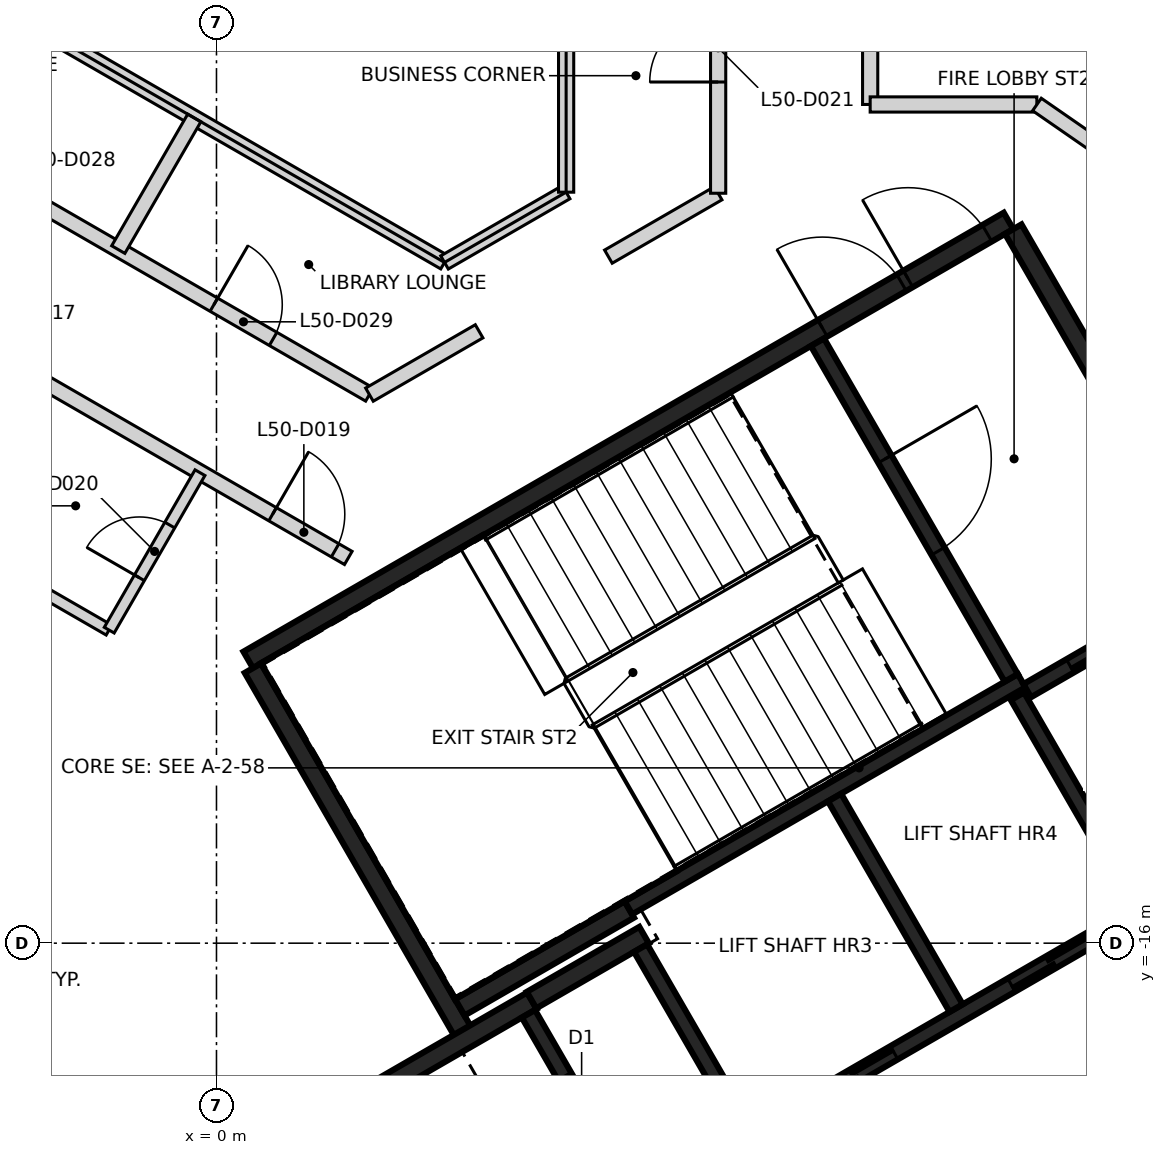
"""IFC4 building model, lengths in metres.
Left out: names, types, materials, properties, quantities, classifications, styles, units other than length and angle.
Written with IfcOpenShell. Run it as: python <this file> out.ifc"""

import sys

from ifc_helpers import new_model, si_unit, direction, frame, frame_2d, origin, place, context, subcontext, project, spatial, rectangle, extrude, element, fill, save


model = new_model("IFC4")
c1 = context("Model", 3, precision=1e-05, world=origin(), true_north=direction((0.0, 1.0)))
c2 = subcontext(c1, "Body", "Model", "MODEL_VIEW")
j1 = project(units=[si_unit("LENGTHUNIT", "METRE"), si_unit("PLANEANGLEUNIT", "RADIAN")], contexts=[c1])
p1 = place(None, origin())
s1 = spatial("IfcSite", under=j1, at=p1, CompositionType="ELEMENT")
p2 = place(p1, origin())
s2 = spatial("IfcBuilding", under=s1, at=p2, CompositionType="ELEMENT")
p3 = place(p2, frame((0.0, 0.0, 200.8)))
s3 = spatial("IfcBuildingStorey", under=s2, at=p3, CompositionType="ELEMENT", Elevation=200.8)
p4 = place(p3, frame((0.417, -12.273, 0.0), z_axis=(0.0, 0.0, 1.0), x_axis=(0.866021906294, 0.500006057782, 0.0)))
e1 = element("IfcWall", 1, at=p4, inside=s3, PredefinedType="SHEAR", context=c2, shape_type="SweptSolid", body=[
    extrude(rectangle(XDim=11.55, YDim=0.25, at=frame_2d((5.775, 0.0))), origin(), (0.0, 0.0, 1.0), 3.25),
])
p5 = place(p4, frame((10.025, 0.0, 0.0)))
e2 = element("IfcOpeningElement", 2, at=p5, cuts=e1, PredefinedType="OPENING", context=c2, shape_type="SweptSolid", body=[
    extrude(rectangle(XDim=1.2, YDim=2.1, at=frame_2d((0.6, 1.05))), frame((0.0, 0.135, 0.0), z_axis=(0.0, -1.0, 0.0), x_axis=(1.0, 0.0, 0.0)), (0.0, 0.0, 1.0), 0.27),
])
p6 = place(p4, frame((8.725, 0.0, 0.0)))
e3 = element("IfcOpeningElement", 3, at=p6, cuts=e1, PredefinedType="OPENING", context=c2, shape_type="SweptSolid", body=[
    extrude(rectangle(XDim=1.2, YDim=2.1, at=frame_2d((0.6, 1.05))), frame((0.0, 0.135, 0.0), z_axis=(0.0, -1.0, 0.0), x_axis=(1.0, 0.0, 0.0)), (0.0, 0.0, 1.0), 0.27),
])
p7 = place(p3, frame((16.133, -16.594, 0.0), z_axis=(0.0, 0.0, 1.0), x_axis=(-0.866022959057, -0.500004234368, 0.0)))
e4 = element("IfcWall", 4, at=p7, inside=s3, PredefinedType="SHEAR", context=c2, shape_type="SweptSolid", body=[
    extrude(rectangle(XDim=8.75, YDim=0.25, at=frame_2d((4.375, 0.0))), origin(), (0.0, 0.0, 1.0), 3.25),
])
p8 = place(p3, frame((3.235, -17.153, 0.0), z_axis=(0.0, 0.0, 1.0), x_axis=(-0.500008851346, 0.866020293397, 0.0)))
e5 = element("IfcWall", 5, at=p8, inside=s3, PredefinedType="SHEAR", context=c2, shape_type="SweptSolid", body=[
    extrude(rectangle(XDim=5.51, YDim=0.25, at=frame_2d((2.755, 0.0))), origin(), (0.0, 0.0, 1.0), 3.25),
])
p9 = place(p3, frame((10.483, -6.606, 0.0), z_axis=(0.0, 0.0, 1.0), x_axis=(0.49999885962, -0.866026062182, 0.0)))
e6 = element("IfcWall", 6, at=p9, inside=s3, PredefinedType="SHEAR", context=c2, shape_type="SweptSolid", body=[
    extrude(rectangle(XDim=5.225, YDim=0.25, at=frame_2d((2.612, 0.0))), origin(), (0.0, 0.0, 1.0), 3.25),
])
p10 = place(p3, frame((1.669, -18.19, 0.0), z_axis=(0.0, 0.0, 1.0), x_axis=(0.866042235819, 0.499970844928, 0.0)))
e7 = element("IfcWall", 7, at=p10, inside=s3, PredefinedType="SHEAR", context=c2, shape_type="SweptSolid", body=[
    extrude(rectangle(XDim=2.865, YDim=0.25, at=frame_2d((1.432, 0.0))), origin(), (0.0, 0.0, 1.0), 3.25),
])
p11 = place(p3, frame((5.431, -15.556, 0.0), z_axis=(0.0, 0.0, 1.0), x_axis=(-0.866022940537, -0.500004266446, 0.0)))
e8 = element("IfcWall", 8, at=p11, inside=s3, PredefinedType="SHEAR", context=c2, shape_type="SweptSolid", body=[
    extrude(rectangle(XDim=2.575, YDim=0.25, at=frame_2d((1.287, 0.0))), origin(), (0.0, 0.0, 1.0), 3.25),
])
p12 = place(p3, frame((4.145, -16.749, 0.0), z_axis=(0.0, 0.0, 1.0), x_axis=(0.866038183914, 0.499977863513, 0.0)))
e9 = element("IfcWall", 9, at=p12, inside=s3, PredefinedType="SHEAR", context=c2, shape_type="SweptSolid", body=[
    extrude(rectangle(XDim=1.71, YDim=0.25, at=frame_2d((0.855, 0.0))), origin(), (0.0, 0.0, 1.0), 3.25),
])
p13 = place(p3, frame((5.419, -15.534, 0.0), z_axis=(0.0, 0.0, 1.0), x_axis=(0.866029065029, 0.499993658486, 0.0)))
e10 = element("IfcWall", 10, at=p13, inside=s3, PredefinedType="SHEAR", context=c2, shape_type="SweptSolid", body=[
    extrude(rectangle(XDim=5.974, YDim=0.2, at=frame_2d((2.987, 0.0))), origin(), (0.0, 0.0, 1.0), 3.25),
])
p14 = place(p3, frame((7.01, -18.542, 0.0), z_axis=(0.0, 0.0, 1.0), x_axis=(0.866030299012, 0.499991521122, 0.0)))
e11 = element("IfcWall", 11, at=p14, inside=s3, PredefinedType="SHEAR", context=c2, shape_type="SweptSolid", body=[
    extrude(rectangle(XDim=6.1, YDim=0.2, at=frame_2d((3.05, 0.0))), origin(), (0.0, 0.0, 1.0), 3.25),
])
p15 = place(p14, frame((1.0, 0.0, 0.0)))
e12 = element("IfcOpeningElement", 12, at=p15, cuts=e11, PredefinedType="OPENING", context=c2, shape_type="SweptSolid", body=[
    extrude(rectangle(XDim=1.2, YDim=2.1, at=frame_2d((0.6, 1.05))), frame((0.0, 0.11, 0.0), z_axis=(0.0, -1.0, 0.0), x_axis=(1.0, 0.0, 0.0)), (0.0, 0.0, 1.0), 0.22),
])
p16 = place(p14, frame((3.982, 0.0, 0.0)))
e13 = element("IfcOpeningElement", 13, at=p16, cuts=e11, PredefinedType="OPENING", context=c2, shape_type="SweptSolid", body=[
    extrude(rectangle(XDim=1.2, YDim=2.1, at=frame_2d((0.6, 1.05))), frame((0.0, 0.11, 0.0), z_axis=(0.0, -1.0, 0.0), x_axis=(1.0, 0.0, 0.0)), (0.0, 0.0, 1.0), 0.22),
])
p17 = place(p3, frame((7.906, -8.094, 0.0), z_axis=(0.0, 0.0, 1.0), x_axis=(0.500027839223, -0.866009330205, 0.0)))
e14 = element("IfcWall", 14, at=p17, inside=s3, PredefinedType="SHEAR", context=c2, shape_type="SweptSolid", body=[
    extrude(rectangle(XDim=5.098, YDim=0.2, at=frame_2d((2.549, 0.0))), origin(), (0.0, 0.0, 1.0), 3.25),
])
p18 = place(p17, frame((1.774, 0.0, 0.0)))
e15 = element("IfcOpeningElement", 15, at=p18, cuts=e14, PredefinedType="OPENING", context=c2, shape_type="SweptSolid", body=[
    extrude(rectangle(XDim=1.4, YDim=2.1, at=frame_2d((0.7, 1.05))), frame((0.0, 0.11, 0.0), z_axis=(0.0, -1.0, 0.0), x_axis=(1.0, 0.0, 0.0)), (0.0, 0.0, 1.0), 0.22),
])
p19 = place(p3, frame((8.132, -14.084, 0.0), z_axis=(0.0, 0.0, 1.0), x_axis=(0.499997778408, -0.866026686418, 0.0)))
e16 = element("IfcWall", 16, at=p19, inside=s3, PredefinedType="SHEAR", context=c2, shape_type="SweptSolid", body=[
    extrude(rectangle(XDim=3.198, YDim=0.2, at=frame_2d((1.599, 0.0))), origin(), (0.0, 0.0, 1.0), 3.25),
])
p20 = place(p3, frame((5.503, -19.352, 0.0), z_axis=(0.0, 0.0, 1.0), x_axis=(-0.499986818241, 0.866033014143, 0.0)))
e17 = element("IfcWall", 17, at=p20, inside=s3, PredefinedType="SHEAR", context=c2, shape_type="SweptSolid", body=[
    extrude(rectangle(XDim=2.798, YDim=0.2, at=frame_2d((1.399, 0.0))), origin(), (0.0, 0.0, 1.0), 3.25),
])
p21 = place(p20, frame((0.949, 0.0, 0.0)))
e18 = element("IfcOpeningElement", 18, at=p21, cuts=e17, PredefinedType="OPENING", context=c2, shape_type="SweptSolid", body=[
    extrude(rectangle(XDim=0.9, YDim=2.1, at=frame_2d((0.45, 1.05))), frame((0.0, 0.11, 0.0), z_axis=(0.0, -1.0, 0.0), x_axis=(1.0, 0.0, 0.0)), (0.0, 0.0, 1.0), 0.22),
])
p22 = place(p3, frame((6.96, -18.455, 0.0), z_axis=(0.0, 0.0, 1.0), x_axis=(-0.499926705758, 0.866067716099, 0.0)))
e19 = element("IfcWall", 19, at=p22, inside=s3, PredefinedType="SHEAR", context=c2, shape_type="SweptSolid", body=[
    extrude(rectangle(XDim=2.759, YDim=0.2, at=frame_2d((1.38, 0.0))), origin(), (0.0, 0.0, 1.0), 3.25),
])
p23 = place(p3, frame((12.088, -15.437, 0.0), z_axis=(0.0, 0.0, 1.0), x_axis=(-0.500026960575, 0.86600983753, 0.0)))
e20 = element("IfcWall", 20, at=p23, inside=s3, PredefinedType="SHEAR", context=c2, shape_type="SweptSolid", body=[
    extrude(rectangle(XDim=3.1, YDim=0.2, at=frame_2d((1.55, 0.0))), origin(), (0.0, 0.0, 1.0), 3.25),
])
p24 = place(p3, frame((10.666, -12.678, 0.0), z_axis=(0.0, 0.0, 1.0), x_axis=(0.866018407898, 0.500012117035, 0.0)))
e21 = element("IfcWall", 21, at=p24, inside=s3, PredefinedType="SHEAR", context=c2, shape_type="SweptSolid", body=[
    extrude(rectangle(XDim=2.651, YDim=0.2, at=frame_2d((1.325, 0.0))), origin(), (0.0, 0.0, 1.0), 3.25),
])
p25 = place(p24, frame((0.652, 0.0, 0.0)))
e22 = element("IfcOpeningElement", 22, at=p25, cuts=e21, PredefinedType="OPENING", context=c2, shape_type="SweptSolid", body=[
    extrude(rectangle(XDim=1.3, YDim=2.1, at=frame_2d((0.65, 1.05))), frame((0.0, 0.11, 0.0), z_axis=(0.0, -1.0, 0.0), x_axis=(1.0, 0.0, 0.0)), (0.0, 0.0, 1.0), 0.22),
])
p26 = place(p3, frame((-8.612, -2.649, 0.0), z_axis=(0.0, 0.0, 1.0), x_axis=(0.866060983284, -0.499938369435, 0.0)))
e23 = element("IfcWall", 23, at=p26, inside=s3, PredefinedType="PARTITIONING", context=c2, shape_type="SweptSolid", body=[
    extrude(rectangle(XDim=12.268, YDim=0.2, at=frame_2d((6.134, 0.0))), origin(), (0.0, 0.0, 1.0), 3.25),
])
p27 = place(p26, frame((1.463, 0.0, 0.0)))
e24 = element("IfcOpeningElement", 24, at=p27, cuts=e23, PredefinedType="OPENING", context=c2, shape_type="SweptSolid", body=[
    extrude(rectangle(XDim=0.9, YDim=2.1, at=frame_2d((0.45, 1.05))), frame((0.0, 0.11, 0.0), z_axis=(0.0, -1.0, 0.0), x_axis=(1.0, 0.0, 0.0)), (0.0, 0.0, 1.0), 0.22),
])
p28 = place(p26, frame((5.683, 0.0, 0.0)))
e25 = element("IfcOpeningElement", 25, at=p28, cuts=e23, PredefinedType="OPENING", context=c2, shape_type="SweptSolid", body=[
    extrude(rectangle(XDim=0.9, YDim=2.1, at=frame_2d((0.45, 1.05))), frame((0.0, 0.11, 0.0), z_axis=(0.0, -1.0, 0.0), x_axis=(1.0, 0.0, 0.0)), (0.0, 0.0, 1.0), 0.22),
])
p29 = place(p26, frame((9.904, 0.0, 0.0)))
e26 = element("IfcOpeningElement", 26, at=p29, cuts=e23, PredefinedType="OPENING", context=c2, shape_type="SweptSolid", body=[
    extrude(rectangle(XDim=0.9, YDim=2.1, at=frame_2d((0.45, 1.05))), frame((0.0, 0.11, 0.0), z_axis=(0.0, -1.0, 0.0), x_axis=(1.0, 0.0, 0.0)), (0.0, 0.0, 1.0), 0.22),
])
p30 = place(p3, frame((-8.601, -4.965, 0.0), z_axis=(0.0, 0.0, 1.0), x_axis=(0.866011155539, -0.500024677872, 0.0)))
e27 = element("IfcWall", 27, at=p30, inside=s3, PredefinedType="PARTITIONING", context=c2, shape_type="SweptSolid", body=[
    extrude(rectangle(XDim=11.934, YDim=0.2, at=frame_2d((5.967, 0.0))), origin(), (0.0, 0.0, 1.0), 3.25),
])
p31 = place(p30, frame((5.039, 0.0, 0.0)))
e28 = element("IfcOpeningElement", 28, at=p31, cuts=e27, PredefinedType="OPENING", context=c2, shape_type="SweptSolid", body=[
    extrude(rectangle(XDim=0.95, YDim=2.1, at=frame_2d((0.475, 1.05))), frame((0.0, 0.11, 0.0), z_axis=(0.0, -1.0, 0.0), x_axis=(1.0, 0.0, 0.0)), (0.0, 0.0, 1.0), 0.22),
])
p32 = place(p30, frame((10.784, 0.0, 0.0)))
e29 = element("IfcOpeningElement", 29, at=p32, cuts=e27, PredefinedType="OPENING", context=c2, shape_type="SweptSolid", body=[
    extrude(rectangle(XDim=0.95, YDim=2.1, at=frame_2d((0.475, 1.05))), frame((0.0, 0.11, 0.0), z_axis=(0.0, -1.0, 0.0), x_axis=(1.0, 0.0, 0.0)), (0.0, 0.0, 1.0), 0.22),
])
p33 = place(p3, frame((2.012, -8.784, 0.0), z_axis=(0.0, 0.0, 1.0), x_axis=(0.865934186891, 0.500157959022, 0.0)))
e30 = element("IfcWall", 30, at=p33, inside=s3, PredefinedType="PARTITIONING", context=c2, shape_type="SweptSolid", body=[
    extrude(rectangle(XDim=1.666, YDim=0.2, at=frame_2d((0.833, 0.0))), origin(), (0.0, 0.0, 1.0), 3.25),
])
p34 = place(p3, frame((5.156, -6.968, 0.0), z_axis=(0.0, 0.0, 1.0), x_axis=(0.865963705197, 0.500106849865, 0.0)))
e31 = element("IfcWall", 31, at=p34, inside=s3, PredefinedType="PARTITIONING", context=c2, shape_type="SweptSolid", body=[
    extrude(rectangle(XDim=1.668, YDim=0.2, at=frame_2d((0.834, 0.0))), origin(), (0.0, 0.0, 1.0), 3.25),
])
p35 = place(p3, frame((6.6, -6.134, 0.0), z_axis=(0.0, 0.0, 1.0), x_axis=(0.0, 1.0, 0.0)))
e32 = element("IfcWall", 32, at=p35, inside=s3, PredefinedType="PARTITIONING", context=c2, shape_type="SweptSolid", body=[
    extrude(rectangle(XDim=12.268, YDim=0.2, at=frame_2d((6.134, 0.0))), origin(), (0.0, 0.0, 1.0), 3.25),
])
p36 = place(p35, frame((1.463, 0.0, 0.0)))
e33 = element("IfcOpeningElement", 33, at=p36, cuts=e32, PredefinedType="OPENING", context=c2, shape_type="SweptSolid", body=[
    extrude(rectangle(XDim=0.9, YDim=2.1, at=frame_2d((0.45, 1.05))), frame((0.0, 0.11, 0.0), z_axis=(0.0, -1.0, 0.0), x_axis=(1.0, 0.0, 0.0)), (0.0, 0.0, 1.0), 0.22),
])
p37 = place(p35, frame((5.684, 0.0, 0.0)))
e34 = element("IfcOpeningElement", 34, at=p37, cuts=e32, PredefinedType="OPENING", context=c2, shape_type="SweptSolid", body=[
    extrude(rectangle(XDim=0.9, YDim=2.1, at=frame_2d((0.45, 1.05))), frame((0.0, 0.11, 0.0), z_axis=(0.0, -1.0, 0.0), x_axis=(1.0, 0.0, 0.0)), (0.0, 0.0, 1.0), 0.22),
])
p38 = place(p35, frame((9.905, 0.0, 0.0)))
e35 = element("IfcOpeningElement", 35, at=p38, cuts=e32, PredefinedType="OPENING", context=c2, shape_type="SweptSolid", body=[
    extrude(rectangle(XDim=0.9, YDim=2.1, at=frame_2d((0.45, 1.05))), frame((0.0, 0.11, 0.0), z_axis=(0.0, -1.0, 0.0), x_axis=(1.0, 0.0, 0.0)), (0.0, 0.0, 1.0), 0.22),
])
p39 = place(p3, frame((8.6, -4.966, 0.0), z_axis=(0.0, 0.0, 1.0), x_axis=(0.0, 1.0, 0.0)))
e36 = element("IfcWall", 36, at=p39, inside=s3, PredefinedType="PARTITIONING", context=c2, shape_type="SweptSolid", body=[
    extrude(rectangle(XDim=11.934, YDim=0.2, at=frame_2d((5.967, 0.0))), origin(), (0.0, 0.0, 1.0), 3.25),
])
p40 = place(p39, frame((0.83, 0.0, 0.0)))
e37 = element("IfcOpeningElement", 37, at=p40, cuts=e36, PredefinedType="OPENING", context=c2, shape_type="SweptSolid", body=[
    extrude(rectangle(XDim=1.0, YDim=2.1, at=frame_2d((0.5, 1.05))), frame((0.0, 0.11, 0.0), z_axis=(0.0, -1.0, 0.0), x_axis=(1.0, 0.0, 0.0)), (0.0, 0.0, 1.0), 0.22),
])
p41 = place(p39, frame((2.835, 0.0, 0.0)))
e38 = element("IfcOpeningElement", 38, at=p41, cuts=e36, PredefinedType="OPENING", context=c2, shape_type="SweptSolid", body=[
    extrude(rectangle(XDim=0.95, YDim=2.1, at=frame_2d((0.475, 1.05))), frame((0.0, 0.11, 0.0), z_axis=(0.0, -1.0, 0.0), x_axis=(1.0, 0.0, 0.0)), (0.0, 0.0, 1.0), 0.22),
])
p42 = place(p39, frame((10.784, 0.0, 0.0)))
e39 = element("IfcOpeningElement", 39, at=p42, cuts=e36, PredefinedType="OPENING", context=c2, shape_type="SweptSolid", body=[
    extrude(rectangle(XDim=0.95, YDim=2.1, at=frame_2d((0.475, 1.05))), frame((0.0, 0.11, 0.0), z_axis=(0.0, -1.0, 0.0), x_axis=(1.0, 0.0, 0.0)), (0.0, 0.0, 1.0), 0.22),
])
p43 = place(p3, frame((8.6, -4.966, 0.0), z_axis=(0.0, 0.0, 1.0), x_axis=(1.0, 0.0, 0.0)))
e40 = element("IfcWall", 40, at=p43, inside=s3, PredefinedType="PARTITIONING", context=c2, shape_type="SweptSolid", body=[
    extrude(rectangle(XDim=2.193, YDim=0.2, at=frame_2d((1.096, 0.0))), origin(), (0.0, 0.0, 1.0), 3.25),
])
p44 = place(p3, frame((10.794, -4.966, 0.0), z_axis=(0.0, 0.0, 1.0), x_axis=(0.822266583859, -0.569102508401, 0.0)))
e41 = element("IfcWall", 41, at=p44, inside=s3, PredefinedType="PARTITIONING", context=c2, shape_type="SweptSolid", body=[
    extrude(rectangle(XDim=0.945, YDim=0.2, at=frame_2d((0.473, 0.0))), origin(), (0.0, 0.0, 1.0), 3.25),
])
p45 = place(p3, frame((-7.6, -0.924, 0.0), z_axis=(0.0, 0.0, 1.0), x_axis=(0.866073324109, -0.499916990376, 0.0)))
e42 = element("IfcWall", 42, at=p45, inside=s3, PredefinedType="PARTITIONING", context=c2, shape_type="SweptSolid", body=[
    extrude(rectangle(XDim=12.24, YDim=0.2, at=frame_2d((6.12, 0.0))), origin(), (0.0, 0.0, 1.0), 3.25),
])
p46 = place(p3, frame((-1.292, -6.875, 0.0), z_axis=(0.0, 0.0, 1.0), x_axis=(0.50011692451, 0.865957886862, 0.0)))
e43 = element("IfcWall", 43, at=p46, inside=s3, PredefinedType="PARTITIONING", context=c2, shape_type="SweptSolid", body=[
    extrude(rectangle(XDim=2.0, YDim=0.2, at=frame_2d((1.0, 0.0))), origin(), (0.0, 0.0, 1.0), 3.25),
])
p47 = place(p3, frame((3.0, -7.044, 0.0), z_axis=(0.0, 0.0, 1.0), x_axis=(0.865875248522, 0.500259986404, 0.0)))
e44 = element("IfcWall", 44, at=p47, inside=s3, PredefinedType="PARTITIONING", context=c2, shape_type="SweptSolid", body=[
    extrude(rectangle(XDim=1.848, YDim=0.2, at=frame_2d((0.924, 0.0))), origin(), (0.0, 0.0, 1.0), 3.25),
])
p48 = place(p3, frame((4.6, -6.12, 0.0), z_axis=(0.0, 0.0, 1.0), x_axis=(0.0, 1.0, 0.0)))
e45 = element("IfcWall", 45, at=p48, inside=s3, PredefinedType="PARTITIONING", context=c2, shape_type="SweptSolid", body=[
    extrude(rectangle(XDim=12.24, YDim=0.2, at=frame_2d((6.12, 0.0))), origin(), (0.0, 0.0, 1.0), 3.25),
])
p49 = place(p3, frame((-3.491, -10.683, 0.0), z_axis=(0.0, 0.0, 1.0), x_axis=(0.866249990711, -0.499610802118, 0.0)))
e46 = element("IfcWall", 46, at=p49, inside=s3, PredefinedType="PARTITIONING", context=c2, shape_type="SweptSolid", body=[
    extrude(rectangle(XDim=2.398, YDim=0.15, at=frame_2d((1.199, 0.0))), origin(), (0.0, 0.0, 1.0), 3.25),
])
p50 = place(p3, frame((-1.411, -11.882, 0.0), z_axis=(0.0, 0.0, 1.0), x_axis=(0.49923627015, 0.866465894635, 0.0)))
e47 = element("IfcWall", 47, at=p50, inside=s3, PredefinedType="PARTITIONING", context=c2, shape_type="SweptSolid", body=[
    extrude(rectangle(XDim=2.391, YDim=0.15, at=frame_2d((1.196, 0.0))), origin(), (0.0, 0.0, 1.0), 3.25),
])
p51 = place(p50, frame((0.796, 0.0, 0.0)))
e48 = element("IfcOpeningElement", 48, at=p51, cuts=e47, PredefinedType="OPENING", context=c2, shape_type="SweptSolid", body=[
    extrude(rectangle(XDim=0.8, YDim=2.1, at=frame_2d((0.4, 1.05))), frame((0.0, 0.085, 0.0), z_axis=(0.0, -1.0, 0.0), x_axis=(1.0, 0.0, 0.0)), (0.0, 0.0, 1.0), 0.17),
])
p52 = place(p25, origin())
e49 = element("IfcDoor", 49, at=p52, inside=s3, OperationType="SLIDING_TO_LEFT", PredefinedType="DOOR", context=c2, shape_type="SweptSolid", body=[
    extrude(rectangle(XDim=1.3, YDim=2.1, at=frame_2d((0.65, 1.05))), frame((0.0, 0.025, 0.0), z_axis=(0.0, -1.0, 0.0), x_axis=(1.0, 0.0, 0.0)), (0.0, 0.0, 1.0), 0.05),
])
fill(e22, e49)
p53 = place(p15, origin())
e50 = element("IfcDoor", 50, at=p53, inside=s3, OperationType="DOUBLE_DOOR_SLIDING", PredefinedType="DOOR", context=c2, shape_type="SweptSolid", body=[
    extrude(rectangle(XDim=1.2, YDim=2.1, at=frame_2d((0.6, 1.05))), frame((0.0, 0.025, 0.0), z_axis=(0.0, -1.0, 0.0), x_axis=(1.0, 0.0, 0.0)), (0.0, 0.0, 1.0), 0.05),
])
fill(e12, e50)
p54 = place(p16, origin())
e51 = element("IfcDoor", 51, at=p54, inside=s3, OperationType="DOUBLE_DOOR_SLIDING", PredefinedType="DOOR", context=c2, shape_type="SweptSolid", body=[
    extrude(rectangle(XDim=1.2, YDim=2.1, at=frame_2d((0.6, 1.05))), frame((0.0, 0.025, 0.0), z_axis=(0.0, -1.0, 0.0), x_axis=(1.0, 0.0, 0.0)), (0.0, 0.0, 1.0), 0.05),
])
fill(e13, e51)
p55 = place(p5, origin())
e52 = element("IfcDoor", 52, at=p55, inside=s3, OperationType="SINGLE_SWING_LEFT", PredefinedType="DOOR", context=c2, shape_type="SweptSolid", body=[
    extrude(rectangle(XDim=1.2, YDim=2.1, at=frame_2d((0.6, 1.05))), frame((0.0, 0.025, 0.0), z_axis=(0.0, -1.0, 0.0), x_axis=(1.0, 0.0, 0.0)), (0.0, 0.0, 1.0), 0.05),
])
fill(e2, e52)
p56 = place(p6, origin())
e53 = element("IfcDoor", 53, at=p56, inside=s3, OperationType="SINGLE_SWING_RIGHT", PredefinedType="DOOR", context=c2, shape_type="SweptSolid", body=[
    extrude(rectangle(XDim=1.2, YDim=2.1, at=frame_2d((0.6, 1.05))), frame((0.0, 0.025, 0.0), z_axis=(0.0, -1.0, 0.0), x_axis=(1.0, 0.0, 0.0)), (0.0, 0.0, 1.0), 0.05),
])
fill(e3, e53)
p57 = place(p18, origin())
e54 = element("IfcDoor", 54, at=p57, inside=s3, OperationType="SINGLE_SWING_LEFT", PredefinedType="DOOR", context=c2, shape_type="SweptSolid", body=[
    extrude(rectangle(XDim=1.4, YDim=2.1, at=frame_2d((0.7, 1.05))), frame((0.0, 0.025, 0.0), z_axis=(0.0, -1.0, 0.0), x_axis=(1.0, 0.0, 0.0)), (0.0, 0.0, 1.0), 0.05),
])
fill(e15, e54)
p58 = place(p32, frame((0.95, 0.0, 0.0), z_axis=(0.0, 0.0, 1.0), x_axis=(-1.0, 0.0, 0.0)))
e55 = element("IfcDoor", 55, at=p58, inside=s3, OperationType="SINGLE_SWING_LEFT", PredefinedType="DOOR", context=c2, shape_type="SweptSolid", body=[
    extrude(rectangle(XDim=0.95, YDim=2.1, at=frame_2d((0.475, 1.05))), frame((0.0, 0.025, 0.0), z_axis=(0.0, -1.0, 0.0), x_axis=(1.0, 0.0, 0.0)), (0.0, 0.0, 1.0), 0.05),
])
fill(e29, e55)
p59 = place(p51, frame((0.8, 0.0, 0.0), z_axis=(0.0, 0.0, 1.0), x_axis=(-1.0, 0.0, 0.0)))
e56 = element("IfcDoor", 56, at=p59, inside=s3, OperationType="SINGLE_SWING_LEFT", PredefinedType="DOOR", context=c2, shape_type="SweptSolid", body=[
    extrude(rectangle(XDim=0.8, YDim=2.1, at=frame_2d((0.4, 1.05))), frame((0.0, 0.025, 0.0), z_axis=(0.0, -1.0, 0.0), x_axis=(1.0, 0.0, 0.0)), (0.0, 0.0, 1.0), 0.05),
])
fill(e48, e56)
p60 = place(p36, origin())
e57 = element("IfcDoor", 57, at=p60, inside=s3, OperationType="SINGLE_SWING_LEFT", PredefinedType="DOOR", context=c2, shape_type="SweptSolid", body=[
    extrude(rectangle(XDim=0.9, YDim=2.1, at=frame_2d((0.45, 1.05))), frame((0.0, 0.025, 0.0), z_axis=(0.0, -1.0, 0.0), x_axis=(1.0, 0.0, 0.0)), (0.0, 0.0, 1.0), 0.05),
])
fill(e33, e57)
p61 = place(p29, origin())
e58 = element("IfcDoor", 58, at=p61, inside=s3, OperationType="SINGLE_SWING_LEFT", PredefinedType="DOOR", context=c2, shape_type="SweptSolid", body=[
    extrude(rectangle(XDim=0.9, YDim=2.1, at=frame_2d((0.45, 1.05))), frame((0.0, 0.025, 0.0), z_axis=(0.0, -1.0, 0.0), x_axis=(1.0, 0.0, 0.0)), (0.0, 0.0, 1.0), 0.05),
])
fill(e26, e58)
save(model, sys.argv[1])
